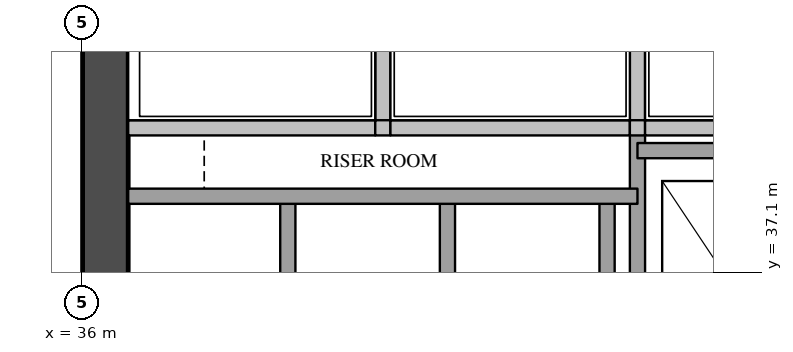
"""IFC4 building model, lengths in metres.
Left out: names, types, materials, properties, quantities, classifications, styles, units other than length and angle.
Written with IfcOpenShell. Run it as: python <this file> out.ifc"""

import sys

from ifc_helpers import new_model, si_unit, direction, frame, frame_2d, origin, place, context, subcontext, project, spatial, rectangle, extrude, element, save


model = new_model("IFC4")
c1 = context("Model", 3, precision=1e-05, world=origin(), true_north=direction((0.0, 1.0)))
c2 = subcontext(c1, "Body", "Model", "MODEL_VIEW")
j1 = project(units=[si_unit("LENGTHUNIT", "METRE"), si_unit("PLANEANGLEUNIT", "RADIAN")], contexts=[c1])
p1 = place(None, origin())
s1 = spatial("IfcSite", under=j1, at=p1, CompositionType="ELEMENT")
p2 = place(p1, origin())
s2 = spatial("IfcBuilding", under=s1, at=p2, CompositionType="ELEMENT")
p3 = place(p2, frame((0.0, 0.0, 34.8)))
s3 = spatial("IfcBuildingStorey", under=s2, at=p3, CompositionType="ELEMENT", Elevation=34.8)
p4 = place(p3, frame((36.3, 29.1, 0.0), z_axis=(0.0, 0.0, 1.0), x_axis=(0.0, 1.0, 0.0)))
e1 = element("IfcWall", 1, at=p4, inside=s3, PredefinedType="SHEAR", context=c2, shape_type="SweptSolid", body=[
    extrude(rectangle(XDim=20.3, YDim=0.6, at=frame_2d((10.15, 0.0))), origin(), (0.0, 0.0, 1.0), 3.5),
])
p5 = place(p4, frame((3.6, 0.0, 0.0)))
e2 = element("IfcOpeningElement", 2, at=p5, cuts=e1, PredefinedType="OPENING", context=c2, shape_type="SweptSolid", body=[
    extrude(rectangle(XDim=1.8, YDim=2.1, at=frame_2d((0.9, 1.05))), frame((0.0, 0.31, 0.0), z_axis=(0.0, -1.0, 0.0), x_axis=(1.0, 0.0, 0.0)), (0.0, 0.0, 1.0), 0.62),
])
p6 = place(p4, frame((16.4, 0.0, 0.0)))
e3 = element("IfcOpeningElement", 3, at=p6, cuts=e1, PredefinedType="OPENING", context=c2, shape_type="SweptSolid", body=[
    extrude(rectangle(XDim=1.0, YDim=2.1, at=frame_2d((0.5, 1.05))), frame((0.0, 0.31, 0.0), z_axis=(0.0, -1.0, 0.0), x_axis=(1.0, 0.0, 0.0)), (0.0, 0.0, 1.0), 0.62),
])
p7 = place(p3, frame((38.7, 34.9, 0.0), z_axis=(0.0, 0.0, 1.0), x_axis=(0.0, 1.0, 0.0)))
e4 = element("IfcWall", 4, at=p7, inside=s3, PredefinedType="SOLIDWALL", context=c2, shape_type="SweptSolid", body=[
    extrude(rectangle(XDim=3.2, YDim=0.2, at=frame_2d((1.6, 0.0))), origin(), (0.0, 0.0, 1.0), 3.5),
])
p8 = place(p3, frame((39.95, 39.0, 0.0), z_axis=(0.0, 0.0, 1.0), x_axis=(0.0, 1.0, 0.0)))
e5 = element("IfcWall", 5, at=p8, inside=s3, PredefinedType="SOLIDWALL", context=c2, shape_type="SweptSolid", body=[
    extrude(rectangle(XDim=1.78, YDim=0.2, at=frame_2d((0.89, 0.0))), origin(), (0.0, 0.0, 1.0), 3.5),
])
for number, where, z_axis, x_axis in (
    (6, (40.8, 34.9, 0.0), (0.0, 0.0, 1.0), (0.0, 1.0, 0.0)),
    (7, (42.9, 34.9, 0.0), (0.0, 0.0, 1.0), (0.0, 1.0, 0.0)),
):
    element("IfcWall", number, at=place(p3, frame(where, z_axis=z_axis, x_axis=x_axis)), inside=s3, PredefinedType="SOLIDWALL", context=c2, shape_type="SweptSolid", body=[
        extrude(rectangle(XDim=3.2, YDim=0.2, at=frame_2d((1.6, 0.0))), origin(), (0.0, 0.0, 1.0), 3.5),
    ])
p9 = place(p3, frame((43.3, 29.1, 0.0), z_axis=(0.0, 0.0, 1.0), x_axis=(0.0, 1.0, 0.0)))
e8 = element("IfcWall", 8, at=p9, inside=s3, PredefinedType="SOLIDWALL", context=c2, shape_type="SweptSolid", body=[
    extrude(rectangle(XDim=9.9, YDim=0.2, at=frame_2d((4.95, 0.0))), origin(), (0.0, 0.0, 1.0), 3.5),
])
p10 = place(p3, frame((43.3, 39.0, 0.0), z_axis=(0.0, 0.0, 1.0), x_axis=(0.0, 1.0, 0.0)))
e9 = element("IfcWall", 9, at=p10, inside=s3, PredefinedType="SOLIDWALL", context=c2, shape_type="SweptSolid", body=[
    extrude(rectangle(XDim=1.78, YDim=0.2, at=frame_2d((0.89, 0.0))), origin(), (0.0, 0.0, 1.0), 3.5),
])
p11 = place(p3, frame((36.6, 38.1, 0.0), z_axis=(0.0, 0.0, 1.0), x_axis=(1.0, 0.0, 0.0)))
e10 = element("IfcWall", 10, at=p11, inside=s3, PredefinedType="SOLIDWALL", context=c2, shape_type="SweptSolid", body=[
    extrude(rectangle(XDim=6.7, YDim=0.2, at=frame_2d((3.35, 0.0))), origin(), (0.0, 0.0, 1.0), 3.5),
])
p12 = place(p3, frame((43.3, 38.7, 0.0), z_axis=(0.0, 0.0, 1.0), x_axis=(1.0, 0.0, 0.0)))
e11 = element("IfcWall", 11, at=p12, inside=s3, PredefinedType="SOLIDWALL", context=c2, shape_type="SweptSolid", body=[
    extrude(rectangle(XDim=4.5, YDim=0.2, at=frame_2d((2.25, 0.0))), origin(), (0.0, 0.0, 1.0), 3.5),
])
p13 = place(p3, frame((36.6, 39.0, 0.0), z_axis=(0.0, 0.0, 1.0), x_axis=(1.0, 0.0, 0.0)))
e12 = element("IfcWall", 12, at=p13, inside=s3, PredefinedType="SOLIDWALL", context=c2, shape_type="SweptSolid", body=[
    extrude(rectangle(XDim=3.25, YDim=0.2, at=frame_2d((1.625, 0.0))), origin(), (0.0, 0.0, 1.0), 3.5),
])
p14 = place(p3, frame((39.85, 39.0, 0.0), z_axis=(0.0, 0.0, 1.0), x_axis=(1.0, 0.0, 0.0)))
e13 = element("IfcWall", 13, at=p14, inside=s3, PredefinedType="SOLIDWALL", context=c2, shape_type="SweptSolid", body=[
    extrude(rectangle(XDim=0.2, YDim=0.2, at=frame_2d((0.1, 0.0))), origin(), (0.0, 0.0, 1.0), 3.5),
])
p15 = place(p3, frame((40.05, 39.0, 0.0), z_axis=(0.0, 0.0, 1.0), x_axis=(1.0, 0.0, 0.0)))
e14 = element("IfcWall", 14, at=p15, inside=s3, PredefinedType="SOLIDWALL", context=c2, shape_type="SweptSolid", body=[
    extrude(rectangle(XDim=3.15, YDim=0.2, at=frame_2d((1.575, 0.0))), origin(), (0.0, 0.0, 1.0), 3.5),
])
p16 = place(p3, frame((43.2, 39.0, 0.0), z_axis=(0.0, 0.0, 1.0), x_axis=(1.0, 0.0, 0.0)))
e15 = element("IfcWall", 15, at=p16, inside=s3, PredefinedType="SOLIDWALL", context=c2, shape_type="SweptSolid", body=[
    extrude(rectangle(XDim=0.2, YDim=0.2, at=frame_2d((0.1, 0.0))), origin(), (0.0, 0.0, 1.0), 3.5),
])
p17 = place(p3, frame((43.4, 39.0, 0.0), z_axis=(0.0, 0.0, 1.0), x_axis=(1.0, 0.0, 0.0)))
e16 = element("IfcWall", 16, at=p17, inside=s3, PredefinedType="SOLIDWALL", context=c2, shape_type="SweptSolid", body=[
    extrude(rectangle(XDim=3.25, YDim=0.2, at=frame_2d((1.625, 0.0))), origin(), (0.0, 0.0, 1.0), 3.5),
])
save(model, sys.argv[1])
